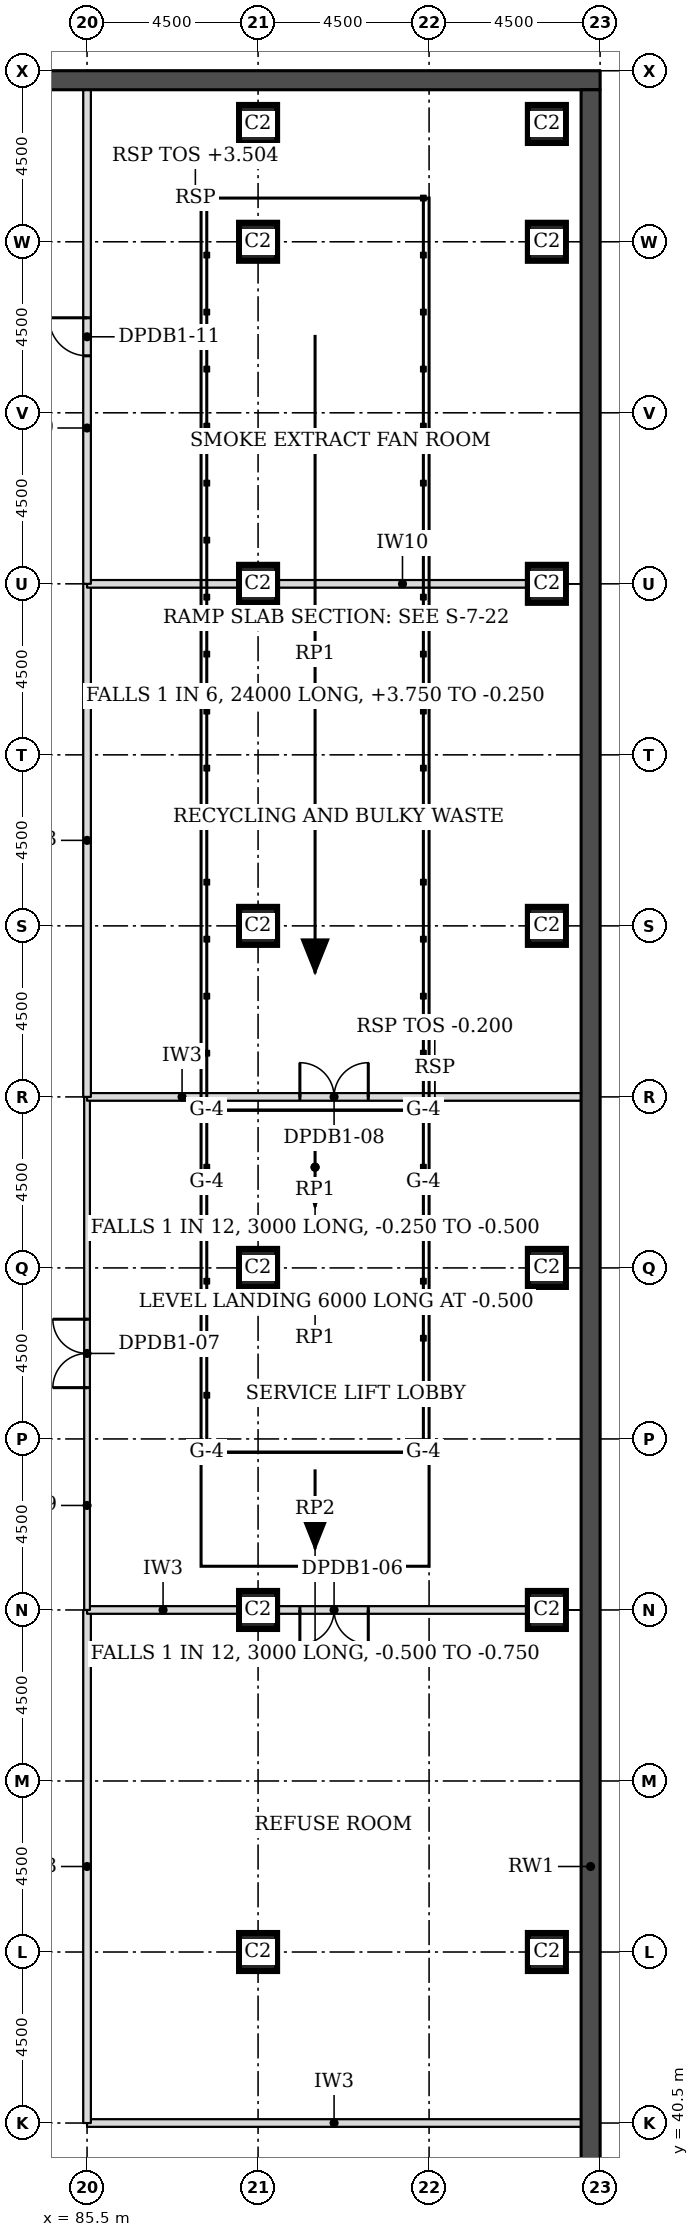
"""IFC4 building model, lengths in metres.
Left out: names, types, materials, properties, quantities, classifications, styles, units other than length and angle.
Written with IfcOpenShell. Run it as: python <this file> out.ifc"""

import sys

from ifc_helpers import new_model, si_unit, direction, frame, frame_2d, origin, origin_2d, place, context, subcontext, project, spatial, rectangle, hollow_rectangle, extrude, element, fill, save


model = new_model("IFC4")
c1 = context("Model", 3, precision=1e-05, world=origin(), true_north=direction((0.0, 1.0)))
c2 = subcontext(c1, "Body", "Model", "MODEL_VIEW")
j1 = project(units=[si_unit("LENGTHUNIT", "METRE"), si_unit("PLANEANGLEUNIT", "RADIAN")], contexts=[c1])
p1 = place(None, origin())
s1 = spatial("IfcSite", under=j1, at=p1, CompositionType="ELEMENT")
p2 = place(p1, origin())
s2 = spatial("IfcBuilding", under=s1, at=p2, CompositionType="ELEMENT")
p3 = place(p2, frame((0.0, 0.0, -4.5)))
s3 = spatial("IfcBuildingStorey", under=s2, at=p3, CompositionType="ELEMENT", Elevation=-4.5)
p4 = place(p3, frame((0.0, 94.25, 0.0), z_axis=(0.0, 0.0, 1.0), x_axis=(1.0, 0.0, 0.0)))
e1 = element("IfcWall", 1, at=p4, inside=s3, PredefinedType="SOLIDWALL", context=c2, shape_type="SweptSolid", body=[
    extrude(rectangle(XDim=99.0, YDim=0.5, at=frame_2d((49.5, 0.0))), origin(), (0.0, 0.0, 1.0), 4.1),
])
p5 = place(p3, frame((98.75, 0.5, 0.0), z_axis=(0.0, 0.0, 1.0), x_axis=(0.0, 1.0, 0.0)))
e2 = element("IfcWall", 2, at=p5, inside=s3, PredefinedType="SOLIDWALL", context=c2, shape_type="SweptSolid", body=[
    extrude(rectangle(XDim=93.5, YDim=0.5, at=frame_2d((46.75, 0.0))), origin(), (0.0, 0.0, 1.0), 4.1),
])
for number, where, z_axis, x_axis in (
    (3, (90.0, 45.0, 0.0), (0.0, 0.0, 1.0), (1.0, 0.0, 0.0)),
    (4, (90.0, 54.0, 0.0), (0.0, 0.0, 1.0), (1.0, 0.0, 0.0)),
    (5, (90.0, 63.0, 0.0), (0.0, 0.0, 1.0), (1.0, 0.0, 0.0)),
    (6, (90.0, 72.0, 0.0), (0.0, 0.0, 1.0), (1.0, 0.0, 0.0)),
    (7, (90.0, 81.0, 0.0), (0.0, 0.0, 1.0), (1.0, 0.0, 0.0)),
    (8, (90.0, 90.0, 0.0), (0.0, 0.0, 1.0), (1.0, 0.0, 0.0)),
    (9, (97.6, 45.0, 0.0), (0.0, 0.0, 1.0), (1.0, 0.0, 0.0)),
    (10, (97.6, 54.0, 0.0), (0.0, 0.0, 1.0), (1.0, 0.0, 0.0)),
    (11, (97.6, 63.0, 0.0), (0.0, 0.0, 1.0), (1.0, 0.0, 0.0)),
    (12, (97.6, 72.0, 0.0), (0.0, 0.0, 1.0), (1.0, 0.0, 0.0)),
    (13, (97.6, 81.0, 0.0), (0.0, 0.0, 1.0), (1.0, 0.0, 0.0)),
    (14, (97.6, 90.0, 0.0), (0.0, 0.0, 1.0), (1.0, 0.0, 0.0)),
    (15, (90.0, 93.1, 0.0), (0.0, 0.0, 1.0), (1.0, 0.0, 0.0)),
    (16, (97.6, 93.1, 0.0), (0.0, 0.0, 1.0), (1.0, 0.0, 0.0)),
):
    element("IfcColumn", number, at=place(p3, frame(where, z_axis=z_axis, x_axis=x_axis)), inside=s3, PredefinedType="COLUMN", context=c2, shape_type="SweptSolid", body=[
        extrude(rectangle(XDim=1.0, YDim=1.0, at=origin_2d()), origin(), (0.0, 0.0, 1.0), 4.5),
    ])
p6 = place(p3, frame((94.65, 67.15, 0.0), z_axis=(0.0, 0.0, 1.0), x_axis=(1.0, 0.0, 0.0)))
e17 = element("IfcColumn", 17, at=p6, inside=s3, PredefinedType="COLUMN", context=c2, shape_type="SweptSolid", body=[
    extrude(hollow_rectangle(XDim=0.3, YDim=0.3, WallThickness=0.012, InnerFilletRadius=0.019, OuterFilletRadius=0.031, at=origin_2d()), origin(), (0.0, 0.0, 1.0), 0.3),
])
p7 = place(p3, frame((88.35, 91.15, 0.0), z_axis=(0.0, 0.0, 1.0), x_axis=(1.0, 0.0, 0.0)))
e18 = element("IfcColumn", 18, at=p7, inside=s3, PredefinedType="COLUMN", context=c2, shape_type="SweptSolid", body=[
    extrude(hollow_rectangle(XDim=0.3, YDim=0.3, WallThickness=0.012, InnerFilletRadius=0.019, OuterFilletRadius=0.031, at=origin_2d()), origin(), (0.0, 0.0, 1.0), 4.004),
])
p8 = place(p3, frame((85.5, 40.5, 0.0), z_axis=(0.0, 0.0, 1.0), x_axis=(1.0, 0.0, 0.0)))
e19 = element("IfcWall", 19, at=p8, inside=s3, PredefinedType="PARTITIONING", context=c2, shape_type="SweptSolid", body=[
    extrude(rectangle(XDim=13.0, YDim=0.2, at=frame_2d((6.5, 0.0))), origin(), (0.0, 0.0, 1.0), 4.1),
])
p9 = place(p3, frame((85.5, 40.5, 0.0), z_axis=(0.0, 0.0, 1.0), x_axis=(0.0, 1.0, 0.0)))
e20 = element("IfcWall", 20, at=p9, inside=s3, PredefinedType="PARTITIONING", context=c2, shape_type="SweptSolid", body=[
    extrude(rectangle(XDim=13.5, YDim=0.2, at=frame_2d((6.75, 0.0))), origin(), (0.0, 0.0, 1.0), 4.1),
])
p10 = place(p3, frame((85.5, 54.0, 0.0), z_axis=(0.0, 0.0, 1.0), x_axis=(1.0, 0.0, 0.0)))
e21 = element("IfcWall", 21, at=p10, inside=s3, PredefinedType="PARTITIONING", context=c2, shape_type="SweptSolid", body=[
    extrude(rectangle(XDim=4.0, YDim=0.2, at=frame_2d((2.0, 0.0))), origin(), (0.0, 0.0, 1.0), 4.1),
])
p11 = place(p3, frame((90.5, 54.0, 0.0), z_axis=(0.0, 0.0, 1.0), x_axis=(1.0, 0.0, 0.0)))
e22 = element("IfcWall", 22, at=p11, inside=s3, PredefinedType="PARTITIONING", context=c2, shape_type="SweptSolid", body=[
    extrude(rectangle(XDim=6.6, YDim=0.2, at=frame_2d((3.3, 0.0))), origin(), (0.0, 0.0, 1.0), 4.1),
])
p12 = place(p11, frame((0.6, 0.0, 0.0)))
e23 = element("IfcOpeningElement", 23, at=p12, cuts=e22, PredefinedType="OPENING", context=c2, shape_type="SweptSolid", body=[
    extrude(rectangle(XDim=1.8, YDim=2.1, at=frame_2d((0.9, 1.05))), frame((0.0, 0.11, 0.0), z_axis=(0.0, -1.0, 0.0), x_axis=(1.0, 0.0, 0.0)), (0.0, 0.0, 1.0), 0.22),
])
p13 = place(p3, frame((85.5, 54.0, 0.0), z_axis=(0.0, 0.0, 1.0), x_axis=(0.0, 1.0, 0.0)))
e24 = element("IfcWall", 24, at=p13, inside=s3, PredefinedType="PARTITIONING", context=c2, shape_type="SweptSolid", body=[
    extrude(rectangle(XDim=13.5, YDim=0.15, at=frame_2d((6.75, 0.0))), origin(), (0.0, 0.0, 1.0), 4.1),
])
p14 = place(p13, frame((5.85, 0.0, 0.0)))
e25 = element("IfcOpeningElement", 25, at=p14, cuts=e24, PredefinedType="OPENING", context=c2, shape_type="SweptSolid", body=[
    extrude(rectangle(XDim=1.8, YDim=2.1, at=frame_2d((0.9, 1.05))), frame((0.0, 0.085, 0.0), z_axis=(0.0, -1.0, 0.0), x_axis=(1.0, 0.0, 0.0)), (0.0, 0.0, 1.0), 0.17),
])
p15 = place(p3, frame((85.5, 67.5, 0.0), z_axis=(0.0, 0.0, 1.0), x_axis=(1.0, 0.0, 0.0)))
e26 = element("IfcWall", 26, at=p15, inside=s3, PredefinedType="PARTITIONING", context=c2, shape_type="SweptSolid", body=[
    extrude(rectangle(XDim=13.0, YDim=0.2, at=frame_2d((6.5, 0.0))), origin(), (0.0, 0.0, 1.0), 4.1),
])
p16 = place(p15, frame((5.6, 0.0, 0.0)))
e27 = element("IfcOpeningElement", 27, at=p16, cuts=e26, PredefinedType="OPENING", context=c2, shape_type="SweptSolid", body=[
    extrude(rectangle(XDim=1.8, YDim=2.1, at=frame_2d((0.9, 1.05))), frame((0.0, 0.11, 0.0), z_axis=(0.0, -1.0, 0.0), x_axis=(1.0, 0.0, 0.0)), (0.0, 0.0, 1.0), 0.22),
])
p17 = place(p3, frame((85.5, 67.5, 0.0), z_axis=(0.0, 0.0, 1.0), x_axis=(0.0, 1.0, 0.0)))
e28 = element("IfcWall", 28, at=p17, inside=s3, PredefinedType="PARTITIONING", context=c2, shape_type="SweptSolid", body=[
    extrude(rectangle(XDim=13.5, YDim=0.2, at=frame_2d((6.75, 0.0))), origin(), (0.0, 0.0, 1.0), 4.1),
])
p18 = place(p3, frame((85.5, 81.0, 0.0), z_axis=(0.0, 0.0, 1.0), x_axis=(1.0, 0.0, 0.0)))
e29 = element("IfcWall", 29, at=p18, inside=s3, PredefinedType="PARTITIONING", context=c2, shape_type="SweptSolid", body=[
    extrude(rectangle(XDim=4.0, YDim=0.2, at=frame_2d((2.0, 0.0))), origin(), (0.0, 0.0, 1.0), 4.1),
])
p19 = place(p3, frame((90.5, 81.0, 0.0), z_axis=(0.0, 0.0, 1.0), x_axis=(1.0, 0.0, 0.0)))
e30 = element("IfcWall", 30, at=p19, inside=s3, PredefinedType="PARTITIONING", context=c2, shape_type="SweptSolid", body=[
    extrude(rectangle(XDim=6.6, YDim=0.2, at=frame_2d((3.3, 0.0))), origin(), (0.0, 0.0, 1.0), 4.1),
])
p20 = place(p3, frame((85.5, 81.0, 0.0), z_axis=(0.0, 0.0, 1.0), x_axis=(0.0, 1.0, 0.0)))
e31 = element("IfcWall", 31, at=p20, inside=s3, PredefinedType="PARTITIONING", context=c2, shape_type="SweptSolid", body=[
    extrude(rectangle(XDim=13.0, YDim=0.2, at=frame_2d((6.5, 0.0))), origin(), (0.0, 0.0, 1.0), 4.1),
])
p21 = place(p20, frame((6.0, 0.0, 0.0)))
e32 = element("IfcOpeningElement", 32, at=p21, cuts=e31, PredefinedType="OPENING", context=c2, shape_type="SweptSolid", body=[
    extrude(rectangle(XDim=1.0, YDim=2.1, at=frame_2d((0.5, 1.05))), frame((0.0, 0.11, 0.0), z_axis=(0.0, -1.0, 0.0), x_axis=(1.0, 0.0, 0.0)), (0.0, 0.0, 1.0), 0.22),
])
p22 = place(p12, frame((1.8, 0.0, 0.0), z_axis=(0.0, 0.0, 1.0), x_axis=(-1.0, 0.0, 0.0)))
e33 = element("IfcDoor", 33, at=p22, inside=s3, OperationType="DOUBLE_DOOR_SINGLE_SWING", PredefinedType="DOOR", context=c2, shape_type="SweptSolid", body=[
    extrude(rectangle(XDim=1.8, YDim=2.1, at=frame_2d((0.9, 1.05))), frame((0.0, 0.025, 0.0), z_axis=(0.0, -1.0, 0.0), x_axis=(1.0, 0.0, 0.0)), (0.0, 0.0, 1.0), 0.05),
])
fill(e23, e33)
p23 = place(p16, origin())
e34 = element("IfcDoor", 34, at=p23, inside=s3, OperationType="DOUBLE_DOOR_SINGLE_SWING", PredefinedType="DOOR", context=c2, shape_type="SweptSolid", body=[
    extrude(rectangle(XDim=1.8, YDim=2.1, at=frame_2d((0.9, 1.05))), frame((0.0, 0.025, 0.0), z_axis=(0.0, -1.0, 0.0), x_axis=(1.0, 0.0, 0.0)), (0.0, 0.0, 1.0), 0.05),
])
fill(e27, e34)
p24 = place(p21, origin())
e35 = element("IfcDoor", 35, at=p24, inside=s3, OperationType="SINGLE_SWING_RIGHT", PredefinedType="DOOR", context=c2, shape_type="SweptSolid", body=[
    extrude(rectangle(XDim=1.0, YDim=2.1, at=frame_2d((0.5, 1.05))), frame((0.0, 0.025, 0.0), z_axis=(0.0, -1.0, 0.0), x_axis=(1.0, 0.0, 0.0)), (0.0, 0.0, 1.0), 0.05),
])
fill(e32, e35)
p25 = place(p14, origin())
e36 = element("IfcDoor", 36, at=p25, inside=s3, OperationType="DOUBLE_DOOR_SINGLE_SWING", PredefinedType="DOOR", context=c2, shape_type="SweptSolid", body=[
    extrude(rectangle(XDim=1.8, YDim=2.1, at=frame_2d((0.9, 1.05))), frame((0.0, 0.025, 0.0), z_axis=(0.0, -1.0, 0.0), x_axis=(1.0, 0.0, 0.0)), (0.0, 0.0, 1.0), 0.05),
])
fill(e25, e36)
save(model, sys.argv[1])
